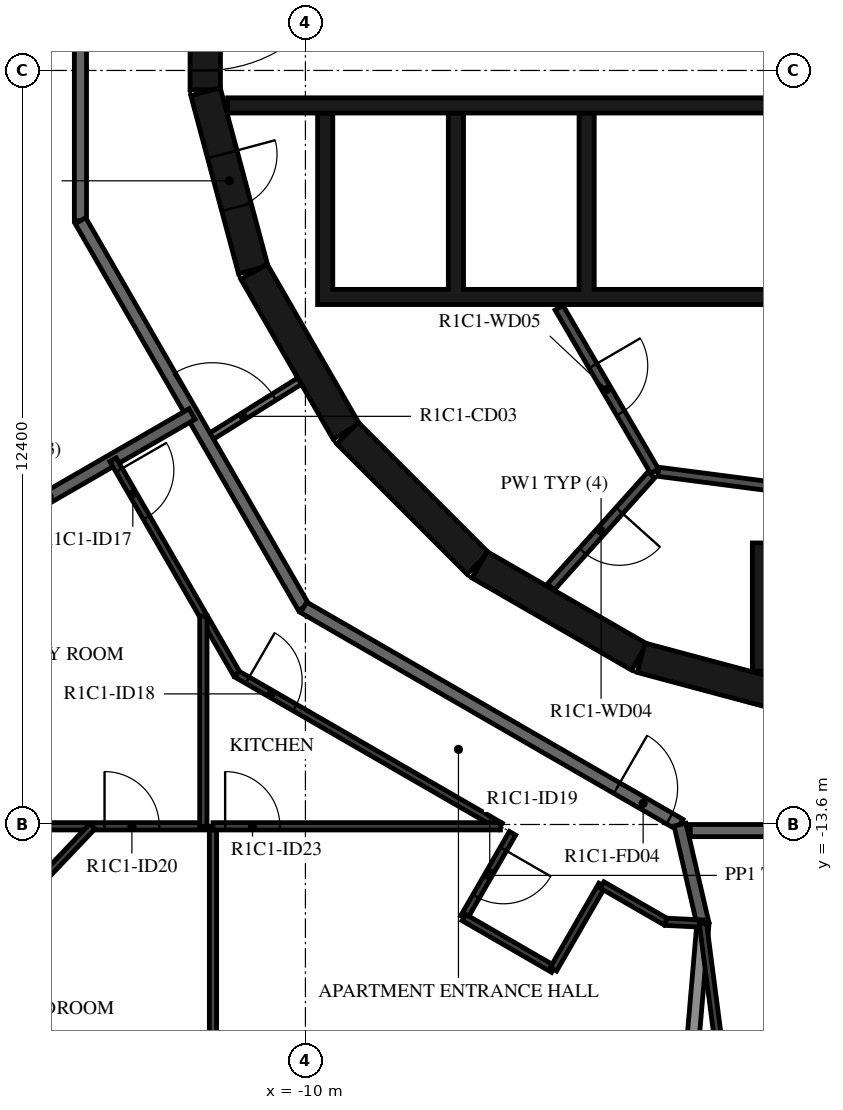
"""IFC4 building model, lengths in metres.
Left out: names, types, materials, properties, quantities, classifications, styles, units other than length and angle.
Written with IfcOpenShell. Run it as: python <this file> out.ifc"""

import sys

from ifc_helpers import new_model, si_unit, direction, frame, frame_2d, origin, place, context, subcontext, project, spatial, polyline, rectangle, outline, extrude, element, fill, save


model = new_model("IFC4")
c1 = context("Model", 3, precision=1e-05, world=origin(), true_north=direction((0.0, 1.0)))
c2 = subcontext(c1, "Body", "Model", "MODEL_VIEW")
j1 = project(units=[si_unit("LENGTHUNIT", "METRE"), si_unit("PLANEANGLEUNIT", "RADIAN")], contexts=[c1])
p1 = place(None, origin())
s1 = spatial("IfcSite", under=j1, at=p1, CompositionType="ELEMENT")
p2 = place(p1, origin())
s2 = spatial("IfcBuilding", under=s1, at=p2, CompositionType="ELEMENT")
p3 = place(p2, frame((0.0, 0.0, 62.9)))
s3 = spatial("IfcBuildingStorey", under=s2, at=p3, CompositionType="ELEMENT", Elevation=62.9)
p4 = place(p3, frame((-11.647, 1.516, 0.0), z_axis=(0.0, 0.0, 1.0), x_axis=(0.0, -1.0, 0.0)))
e1 = element("IfcWall", 1, at=p4, inside=s3, PredefinedType="SHEAR", context=c2, shape_type="SweptSolid", body=[
    extrude(rectangle(XDim=3.033, YDim=0.5, at=frame_2d((1.516, 0.0))), origin(), (0.0, 0.0, 1.0), 3.12),
])
p5 = place(p4, frame((0.316, 0.0, 0.0)))
e2 = element("IfcOpeningElement", 2, at=p5, cuts=e1, PredefinedType="OPENING", context=c2, shape_type="SweptSolid", body=[
    extrude(rectangle(XDim=2.4, YDim=2.1, at=frame_2d((1.2, 1.05))), frame((0.0, 0.26, 0.0), z_axis=(0.0, -1.0, 0.0), x_axis=(1.0, 0.0, 0.0)), (0.0, 0.0, 1.0), 0.52),
])
p6 = place(p3, frame((-11.643, -1.55, 0.0), z_axis=(0.0, 0.0, 1.0), x_axis=(0.258734743916, -0.965948410781, 0.0)))
e3 = element("IfcWall", 3, at=p6, inside=s3, PredefinedType="SHEAR", context=c2, shape_type="SweptSolid", body=[
    extrude(rectangle(XDim=3.033, YDim=0.5, at=frame_2d((1.516, 0.0))), origin(), (0.0, 0.0, 1.0), 3.12),
])
p7 = place(p6, frame((1.066, 0.0, 0.0)))
e4 = element("IfcOpeningElement", 4, at=p7, cuts=e3, PredefinedType="OPENING", context=c2, shape_type="SweptSolid", body=[
    extrude(rectangle(XDim=0.9, YDim=2.1, at=frame_2d((0.45, 1.05))), frame((0.0, 0.26, 0.0), z_axis=(0.0, -1.0, 0.0), x_axis=(1.0, 0.0, 0.0)), (0.0, 0.0, 1.0), 0.52),
])
p8 = place(p3, frame((-10.845, -4.51, 0.0), z_axis=(0.0, 0.0, 1.0), x_axis=(0.500087131594, -0.865975092491, 0.0)))
e5 = element("IfcWall", 5, at=p8, inside=s3, PredefinedType="SHEAR", context=c2, shape_type="SweptSolid", body=[
    extrude(rectangle(XDim=3.033, YDim=0.5, at=frame_2d((1.516, 0.0))), origin(), (0.0, 0.0, 1.0), 3.12),
])
p9 = place(p3, frame((-9.308, -7.164, 0.0), z_axis=(0.0, 0.0, 1.0), x_axis=(0.707106781187, -0.707106781187, 0.0)))
e6 = element("IfcWall", 6, at=p9, inside=s3, PredefinedType="SHEAR", context=c2, shape_type="SweptSolid", body=[
    extrude(rectangle(XDim=3.032, YDim=0.5, at=frame_2d((1.516, 0.0))), origin(), (0.0, 0.0, 1.0), 3.12),
])
for number, where, z_axis, x_axis in (
    (7, (-7.137, -9.329, 0.0), (0.0, 0.0, 1.0), (0.866, -0.5, 0.0)),
    (8, (-4.479, -10.858, 0.0), (0.0, 0.0, 1.0), (0.966, -0.259, 0.0)),
):
    element("IfcWall", number, at=place(p3, frame(where, z_axis=z_axis, x_axis=x_axis)), inside=s3, PredefinedType="SHEAR", context=c2, shape_type="SweptSolid", body=[
        extrude(rectangle(XDim=3.033, YDim=0.5, at=frame_2d((1.516, 0.0))), origin(), (0.0, 0.0, 1.0), 3.12),
    ])
p10 = place(p3, frame((-2.525, -8.97, 0.0), z_axis=(0.0, 0.0, 1.0), x_axis=(0.0, -1.0, 0.0)))
e9 = element("IfcWall", 9, at=p10, inside=s3, PredefinedType="SHEAR", context=c2, shape_type="SweptSolid", body=[
    extrude(rectangle(XDim=2.11, YDim=0.25, at=frame_2d((1.055, 0.0))), origin(), (0.0, 0.0, 1.0), 3.12),
])
p11 = place(p3, origin())
e10 = element("IfcWall", 10, at=p11, inside=s3, PredefinedType="SHEAR", context=c2, shape_type="SweptSolid", body=[
    extrude(outline(polyline([(9.8, -5.05), (9.8, -4.8), (9.8, -1.9), (9.55, -1.9), (9.55, -4.8), (7.65, -4.8), (7.65, -1.9), (7.4, -1.9), (7.4, -4.8), (5.5, -4.8), (5.5, -1.9), (5.25, -1.9), (5.25, -4.8), (3.35, -4.8), (3.35, -1.9), (3.1, -1.9), (3.1, -4.8), (-5.25, -4.8), (-5.25, -1.9), (-5.5, -1.9), (-5.5, -4.8), (-7.4, -4.8), (-7.4, -1.9), (-7.65, -1.9), (-7.65, -4.8), (-9.55, -4.8), (-9.55, -1.9), (-9.8, -1.9), (-9.8, -4.8), (-9.8, -5.05), (9.8, -5.05)])), origin(), (0.0, 0.0, 1.0), 3.12),
])
p12 = place(p3, frame((-11.28, -1.775, 0.0), z_axis=(0.0, 0.0, 1.0), x_axis=(1.0, 0.0, 0.0)))
e11 = element("IfcWall", 11, at=p12, inside=s3, PredefinedType="SHEAR", context=c2, shape_type="SweptSolid", body=[
    extrude(rectangle(XDim=14.38, YDim=0.25, at=frame_2d((7.19, 0.0))), origin(), (0.0, 0.0, 1.0), 3.12),
])
p13 = place(p12, frame((9.755, 0.0, 0.0)))
e12 = element("IfcOpeningElement", 12, at=p13, cuts=e11, PredefinedType="OPENING", context=c2, shape_type="SweptSolid", body=[
    extrude(rectangle(XDim=0.9, YDim=2.1, at=frame_2d((0.45, 1.05))), frame((0.0, 0.135, 0.0), z_axis=(0.0, -1.0, 0.0), x_axis=(1.0, 0.0, 0.0)), (0.0, 0.0, 1.0), 0.27),
])
p14 = place(p3, frame((-5.829, -5.102, 0.0), z_axis=(0.0, 0.0, 1.0), x_axis=(0.504480008384, -0.863423373057, 0.0)))
e13 = element("IfcWall", 13, at=p14, inside=s3, PredefinedType="PARTITIONING", context=c2, shape_type="SweptSolid", body=[
    extrude(rectangle(XDim=3.115, YDim=0.15, at=frame_2d((1.558, 0.0))), origin(), (0.0, 0.0, 1.0), 3.12),
])
p15 = place(p14, frame((1.107, 0.0, 0.0)))
e14 = element("IfcOpeningElement", 14, at=p15, cuts=e13, PredefinedType="OPENING", context=c2, shape_type="SweptSolid", body=[
    extrude(rectangle(XDim=0.9, YDim=2.1, at=frame_2d((0.45, 1.05))), frame((0.0, 0.085, 0.0), z_axis=(0.0, -1.0, 0.0), x_axis=(1.0, 0.0, 0.0)), (0.0, 0.0, 1.0), 0.17),
])
p16 = place(p3, frame((-4.311, -7.851, 0.0), z_axis=(0.0, 0.0, 1.0), x_axis=(-0.667869133096, -0.744278725383, 0.0)))
e15 = element("IfcWall", 15, at=p16, inside=s3, PredefinedType="PARTITIONING", context=c2, shape_type="SweptSolid", body=[
    extrude(rectangle(XDim=2.476, YDim=0.15, at=frame_2d((1.238, 0.0))), origin(), (0.0, 0.0, 1.0), 3.12),
])
p17 = place(p16, frame((0.788, 0.0, 0.0)))
e16 = element("IfcOpeningElement", 16, at=p17, cuts=e15, PredefinedType="OPENING", context=c2, shape_type="SweptSolid", body=[
    extrude(rectangle(XDim=0.9, YDim=2.1, at=frame_2d((0.45, 1.05))), frame((0.0, 0.085, 0.0), z_axis=(0.0, -1.0, 0.0), x_axis=(1.0, 0.0, 0.0)), (0.0, 0.0, 1.0), 0.17),
])
p18 = place(p3, frame((-4.198, -7.799, 0.0), z_axis=(0.0, 0.0, 1.0), x_axis=(0.991686747293, -0.128675542523, 0.0)))
e17 = element("IfcWall", 17, at=p18, inside=s3, PredefinedType="PARTITIONING", context=c2, shape_type="SweptSolid", body=[
    extrude(rectangle(XDim=1.793, YDim=0.15, at=frame_2d((0.896, 0.0))), origin(), (0.0, 0.0, 1.0), 3.12),
])
p19 = place(p3, frame((-11.625, -7.264, 0.0), z_axis=(0.0, 0.0, 1.0), x_axis=(0.84803632456, 0.529938102259, 0.0)))
e18 = element("IfcWall", 18, at=p19, inside=s3, PredefinedType="PARTITIONING", context=c2, shape_type="SweptSolid", body=[
    extrude(rectangle(XDim=1.804, YDim=0.12, at=frame_2d((0.902, 0.0))), origin(), (0.0, 0.0, 1.0), 3.12),
])
p20 = place(p19, frame((0.11, 0.0, 0.0)))
e19 = element("IfcOpeningElement", 19, at=p20, cuts=e18, PredefinedType="OPENING", context=c2, shape_type="SweptSolid", body=[
    extrude(rectangle(XDim=1.2, YDim=2.1, at=frame_2d((0.6, 1.05))), frame((0.0, 0.07, 0.0), z_axis=(0.0, -1.0, 0.0), x_axis=(1.0, 0.0, 0.0)), (0.0, 0.0, 1.0), 0.14),
])
for number, where, z_axis, x_axis in (
    (20, (-13.7, 3.671, 0.0), (0.0, 0.0, 1.0), (0.0, -1.0, 0.0)),
    (21, (-13.7, -3.671, 0.0), (0.0, 0.0, 1.0), (0.5, -0.866, 0.0)),
):
    element("IfcWall", number, at=place(p3, frame(where, z_axis=z_axis, x_axis=x_axis)), inside=s3, PredefinedType="STANDARD", context=c2, shape_type="SweptSolid", body=[
        extrude(rectangle(XDim=7.342, YDim=0.2, at=frame_2d((3.671, 0.0))), origin(), (0.0, 0.0, 1.0), 3.12),
    ])
p21 = place(p3, frame((-10.029, -10.029, 0.0), z_axis=(0.0, 0.0, 1.0), x_axis=(0.866022878987, -0.500004373052, 0.0)))
e22 = element("IfcWall", 22, at=p21, inside=s3, PredefinedType="STANDARD", context=c2, shape_type="SweptSolid", body=[
    extrude(rectangle(XDim=7.146, YDim=0.2, at=frame_2d((3.573, 0.0))), origin(), (0.0, 0.0, 1.0), 3.12),
])
p22 = place(p21, frame((5.947, 0.0, 0.0)))
e23 = element("IfcOpeningElement", 23, at=p22, cuts=e22, PredefinedType="OPENING", context=c2, shape_type="SweptSolid", body=[
    extrude(rectangle(XDim=1.0, YDim=2.1, at=frame_2d((0.5, 1.05))), frame((0.0, 0.11, 0.0), z_axis=(0.0, -1.0, 0.0), x_axis=(1.0, 0.0, 0.0)), (0.0, 0.0, 1.0), 0.22),
])
p23 = place(p3, frame((-3.671, -13.7, 0.0), z_axis=(0.0, 0.0, 1.0), x_axis=(1.0, 0.0, 0.0)))
e24 = element("IfcWall", 24, at=p23, inside=s3, PredefinedType="STANDARD", context=c2, shape_type="SweptSolid", body=[
    extrude(rectangle(XDim=7.342, YDim=0.2, at=frame_2d((3.671, 0.0))), origin(), (0.0, 0.0, 1.0), 3.12),
])
p24 = place(p23, frame((2.1, 0.0, 0.0)))
e25 = element("IfcOpeningElement", 25, at=p24, cuts=e24, PredefinedType="OPENING", context=c2, shape_type="SweptSolid", body=[
    extrude(rectangle(XDim=1.0, YDim=2.1, at=frame_2d((0.5, 1.05))), frame((0.0, 0.11, 0.0), z_axis=(0.0, -1.0, 0.0), x_axis=(1.0, 0.0, 0.0)), (0.0, 0.0, 1.0), 0.22),
])
p25 = place(p3, frame((-16.565, -9.564, 0.0), z_axis=(0.0, 0.0, 1.0), x_axis=(0.866028274568, 0.499995027624, 0.0)))
e26 = element("IfcWall", 26, at=p25, inside=s3, PredefinedType="STANDARD", context=c2, shape_type="SweptSolid", body=[
    extrude(rectangle(XDim=5.427, YDim=0.2, at=frame_2d((2.714, 0.0))), origin(), (0.0, 0.0, 1.0), 3.12),
])
p26 = place(p3, frame((-3.463, -15.23, 0.0), z_axis=(0.0, 0.0, 1.0), x_axis=(-0.225894501138, 0.974151771725, 0.0)))
e27 = element("IfcWall", 27, at=p26, inside=s3, PredefinedType="STANDARD", context=c2, shape_type="SweptSolid", body=[
    extrude(rectangle(XDim=1.671, YDim=0.2, at=frame_2d((0.835, 0.0))), origin(), (0.0, 0.0, 1.0), 3.12),
])
p27 = place(p3, frame((-3.84, -19.63, 0.0), z_axis=(0.0, 0.0, 1.0), x_axis=(0.085470135005, 0.996340732893, 0.0)))
e28 = element("IfcWall", 28, at=p27, inside=s3, PredefinedType="STANDARD", context=c2, shape_type="SweptSolid", body=[
    extrude(rectangle(XDim=4.416, YDim=0.2, at=frame_2d((2.208, 0.0))), origin(), (0.0, 0.0, 1.0), 2.73),
])
p28 = place(p3, frame((-13.164, -7.6, 0.0), z_axis=(0.0, 0.0, 1.0), x_axis=(0.500000928893, -0.866024867487, 0.0)))
e29 = element("IfcWall", 29, at=p28, inside=s3, PredefinedType="PARTITIONING", context=c2, shape_type="SweptSolid", body=[
    extrude(rectangle(XDim=4.073, YDim=0.12, at=frame_2d((2.036, 0.0))), origin(), (0.0, 0.0, 1.0), 3.12),
])
p29 = place(p28, frame((0.2, 0.0, 0.0)))
e30 = element("IfcOpeningElement", 30, at=p29, cuts=e29, PredefinedType="OPENING", context=c2, shape_type="SweptSolid", body=[
    extrude(rectangle(XDim=0.9, YDim=2.1, at=frame_2d((0.45, 1.05))), frame((0.0, 0.07, 0.0), z_axis=(0.0, -1.0, 0.0), x_axis=(1.0, 0.0, 0.0)), (0.0, 0.0, 1.0), 0.14),
])
p30 = place(p3, frame((-11.127, -11.127, 0.0), z_axis=(0.0, 0.0, 1.0), x_axis=(0.866034514313, -0.499984219769, 0.0)))
e31 = element("IfcWall", 31, at=p30, inside=s3, PredefinedType="PARTITIONING", context=c2, shape_type="SweptSolid", body=[
    extrude(rectangle(XDim=5.006, YDim=0.12, at=frame_2d((2.503, 0.0))), origin(), (0.0, 0.0, 1.0), 3.12),
])
p31 = place(p30, frame((0.2, 0.0, 0.0)))
e32 = element("IfcOpeningElement", 32, at=p31, cuts=e31, PredefinedType="OPENING", context=c2, shape_type="SweptSolid", body=[
    extrude(rectangle(XDim=0.9, YDim=2.1, at=frame_2d((0.45, 1.05))), frame((0.0, 0.07, 0.0), z_axis=(0.0, -1.0, 0.0), x_axis=(1.0, 0.0, 0.0)), (0.0, 0.0, 1.0), 0.14),
])
p32 = place(p3, frame((-6.594, -13.744, 0.0), z_axis=(0.0, 0.0, 1.0), x_axis=(-0.499947031044, -0.866055983265, 0.0)))
e33 = element("IfcWall", 33, at=p32, inside=s3, PredefinedType="PARTITIONING", context=c2, shape_type="SweptSolid", body=[
    extrude(rectangle(XDim=1.6, YDim=0.12, at=frame_2d((0.8, 0.0))), origin(), (0.0, 0.0, 1.0), 3.12),
])
p33 = place(p32, frame((0.3, 0.0, 0.0)))
e34 = element("IfcOpeningElement", 34, at=p33, cuts=e33, PredefinedType="OPENING", context=c2, shape_type="SweptSolid", body=[
    extrude(rectangle(XDim=0.9, YDim=2.1, at=frame_2d((0.45, 1.05))), frame((0.0, 0.07, 0.0), z_axis=(0.0, -1.0, 0.0), x_axis=(1.0, 0.0, 0.0)), (0.0, 0.0, 1.0), 0.14),
])
p34 = place(p3, frame((-7.394, -15.13, 0.0), z_axis=(0.0, 0.0, 1.0), x_axis=(0.86605165483, -0.499954529098, 0.0)))
e35 = element("IfcWall", 35, at=p34, inside=s3, PredefinedType="PARTITIONING", context=c2, shape_type="SweptSolid", body=[
    extrude(rectangle(XDim=1.7, YDim=0.12, at=frame_2d((0.85, 0.0))), origin(), (0.0, 0.0, 1.0), 3.12),
])
p35 = place(p3, frame((-5.922, -15.98, 0.0), z_axis=(0.0, 0.0, 1.0), x_axis=(0.500013115284, 0.866017831539, 0.0)))
e36 = element("IfcWall", 36, at=p35, inside=s3, PredefinedType="PARTITIONING", context=c2, shape_type="SweptSolid", body=[
    extrude(rectangle(XDim=1.6, YDim=0.12, at=frame_2d((0.8, 0.0))), origin(), (0.0, 0.0, 1.0), 3.12),
])
p36 = place(p3, frame((-5.122, -14.594, 0.0), z_axis=(0.0, 0.0, 1.0), x_axis=(0.86610168388, -0.499867855718, 0.0)))
e37 = element("IfcWall", 37, at=p36, inside=s3, PredefinedType="PARTITIONING", context=c2, shape_type="SweptSolid", body=[
    extrude(rectangle(XDim=1.211, YDim=0.12, at=frame_2d((0.605, 0.0))), origin(), (0.0, 0.0, 1.0), 3.12),
])
p37 = place(p3, frame((-4.073, -15.2, 0.0), z_axis=(0.0, 0.0, 1.0), x_axis=(0.99879090756, -0.049160176723, 0.0)))
e38 = element("IfcWall", 38, at=p37, inside=s3, PredefinedType="PARTITIONING", context=c2, shape_type="SweptSolid", body=[
    extrude(rectangle(XDim=0.611, YDim=0.12, at=frame_2d((0.305, 0.0))), origin(), (0.0, 0.0, 1.0), 3.12),
])
p38 = place(p3, frame((-19.794, -13.63, 0.0), z_axis=(0.0, 0.0, 1.0), x_axis=(1.0, 0.0, 0.0)))
e39 = element("IfcWall", 39, at=p38, inside=s3, PredefinedType="PARTITIONING", context=c2, shape_type="SweptSolid", body=[
    extrude(rectangle(XDim=8.156, YDim=0.12, at=frame_2d((4.078, 0.0))), origin(), (0.0, 0.0, 1.0), 3.12),
])
p39 = place(p38, frame((6.491, 0.0, 0.0)))
e40 = element("IfcOpeningElement", 40, at=p39, cuts=e39, PredefinedType="OPENING", context=c2, shape_type="SweptSolid", body=[
    extrude(rectangle(XDim=0.9, YDim=2.1, at=frame_2d((0.45, 1.05))), frame((0.0, 0.07, 0.0), z_axis=(0.0, -1.0, 0.0), x_axis=(1.0, 0.0, 0.0)), (0.0, 0.0, 1.0), 0.14),
])
p40 = place(p3, frame((-11.678, -13.63, 0.0), z_axis=(0.0, 0.0, 1.0), x_axis=(0.0, 1.0, 0.0)))
e41 = element("IfcWall", 41, at=p40, inside=s3, PredefinedType="PARTITIONING", context=c2, shape_type="SweptSolid", body=[
    extrude(rectangle(XDim=3.458, YDim=0.12, at=frame_2d((1.729, 0.0))), origin(), (0.0, 0.0, 1.0), 3.12),
])
p41 = place(p3, frame((-19.2, -19.63, 0.0), z_axis=(0.0, 0.0, 1.0), x_axis=(0.688544699396, 0.72519390299, 0.0)))
e42 = element("IfcWall", 42, at=p41, inside=s3, PredefinedType="PARTITIONING", context=c2, shape_type="SweptSolid", body=[
    extrude(rectangle(XDim=8.274, YDim=0.12, at=frame_2d((4.137, 0.0))), origin(), (0.0, 0.0, 1.0), 3.12),
])
p42 = place(p41, frame((0.8, 0.0, 0.0)))
e43 = element("IfcOpeningElement", 43, at=p42, cuts=e42, PredefinedType="OPENING", context=c2, shape_type="SweptSolid", body=[
    extrude(rectangle(XDim=0.9, YDim=2.1, at=frame_2d((0.45, 1.05))), frame((0.0, 0.07, 0.0), z_axis=(0.0, -1.0, 0.0), x_axis=(1.0, 0.0, 0.0)), (0.0, 0.0, 1.0), 0.14),
])
p43 = place(p3, frame((-11.52, -19.63, 0.0), z_axis=(0.0, 0.0, 1.0), x_axis=(0.0, 1.0, 0.0)))
e44 = element("IfcWall", 44, at=p43, inside=s3, PredefinedType="PARTITIONING", context=c2, shape_type="SweptSolid", body=[
    extrude(rectangle(XDim=6.0, YDim=0.12, at=frame_2d((3.0, 0.0))), origin(), (0.0, 0.0, 1.0), 2.73),
])
p44 = place(p3, frame((-11.52, -13.63, 0.0), z_axis=(0.0, 0.0, 1.0), x_axis=(1.0, 0.0, 0.0)))
e45 = element("IfcWall", 45, at=p44, inside=s3, PredefinedType="PARTITIONING", context=c2, shape_type="SweptSolid", body=[
    extrude(rectangle(XDim=4.728, YDim=0.12, at=frame_2d((2.364, 0.0))), origin(), (0.0, 0.0, 1.0), 3.12),
])
p45 = place(p44, frame((0.2, 0.0, 0.0)))
e46 = element("IfcOpeningElement", 46, at=p45, cuts=e45, PredefinedType="OPENING", context=c2, shape_type="SweptSolid", body=[
    extrude(rectangle(XDim=0.9, YDim=2.1, at=frame_2d((0.45, 1.05))), frame((0.0, 0.07, 0.0), z_axis=(0.0, -1.0, 0.0), x_axis=(1.0, 0.0, 0.0)), (0.0, 0.0, 1.0), 0.14),
])
p46 = place(p3, frame((-3.463, -15.23, 0.0), z_axis=(0.0, 0.0, 1.0), x_axis=(0.129260547059, -0.991610665016, 0.0)))
e47 = element("IfcWall", 47, at=p46, inside=s3, PredefinedType="PARTITIONING", context=c2, shape_type="SweptSolid", body=[
    extrude(rectangle(XDim=2.92, YDim=0.12, at=frame_2d((1.46, 0.0))), origin(), (0.0, 0.0, 1.0), 3.12),
])
p47 = place(p5, origin())
e48 = element("IfcDoor", 48, at=p47, inside=s3, OperationType="DOUBLE_DOOR_SINGLE_SWING", PredefinedType="DOOR", context=c2, shape_type="SweptSolid", body=[
    extrude(rectangle(XDim=2.4, YDim=2.1, at=frame_2d((1.2, 1.05))), frame((0.0, 0.025, 0.0), z_axis=(0.0, -1.0, 0.0), x_axis=(1.0, 0.0, 0.0)), (0.0, 0.0, 1.0), 0.05),
])
fill(e2, e48)
p48 = place(p17, origin())
e49 = element("IfcDoor", 49, at=p48, inside=s3, OperationType="SINGLE_SWING_LEFT", PredefinedType="DOOR", context=c2, shape_type="SweptSolid", body=[
    extrude(rectangle(XDim=0.9, YDim=2.1, at=frame_2d((0.45, 1.05))), frame((0.0, 0.025, 0.0), z_axis=(0.0, -1.0, 0.0), x_axis=(1.0, 0.0, 0.0)), (0.0, 0.0, 1.0), 0.05),
])
fill(e16, e49)
p49 = place(p15, origin())
e50 = element("IfcDoor", 50, at=p49, inside=s3, OperationType="SINGLE_SWING_RIGHT", PredefinedType="DOOR", context=c2, shape_type="SweptSolid", body=[
    extrude(rectangle(XDim=0.9, YDim=2.1, at=frame_2d((0.45, 1.05))), frame((0.0, 0.025, 0.0), z_axis=(0.0, -1.0, 0.0), x_axis=(1.0, 0.0, 0.0)), (0.0, 0.0, 1.0), 0.05),
])
fill(e14, e50)
p50 = place(p7, origin())
e51 = element("IfcDoor", 51, at=p50, inside=s3, OperationType="SINGLE_SWING_LEFT", PredefinedType="DOOR", context=c2, shape_type="SweptSolid", body=[
    extrude(rectangle(XDim=0.9, YDim=2.1, at=frame_2d((0.45, 1.05))), frame((0.0, 0.025, 0.0), z_axis=(0.0, -1.0, 0.0), x_axis=(1.0, 0.0, 0.0)), (0.0, 0.0, 1.0), 0.05),
])
fill(e4, e51)
p51 = place(p22, origin())
e52 = element("IfcDoor", 52, at=p51, inside=s3, OperationType="SINGLE_SWING_LEFT", PredefinedType="DOOR", context=c2, shape_type="SweptSolid", body=[
    extrude(rectangle(XDim=1.0, YDim=2.1, at=frame_2d((0.5, 1.05))), frame((0.0, 0.025, 0.0), z_axis=(0.0, -1.0, 0.0), x_axis=(1.0, 0.0, 0.0)), (0.0, 0.0, 1.0), 0.05),
])
fill(e23, e52)
p52 = place(p29, origin())
e53 = element("IfcDoor", 53, at=p52, inside=s3, OperationType="SINGLE_SWING_LEFT", PredefinedType="DOOR", context=c2, shape_type="SweptSolid", body=[
    extrude(rectangle(XDim=0.9, YDim=2.1, at=frame_2d((0.45, 1.05))), frame((0.0, 0.025, 0.0), z_axis=(0.0, -1.0, 0.0), x_axis=(1.0, 0.0, 0.0)), (0.0, 0.0, 1.0), 0.05),
])
fill(e30, e53)
p53 = place(p31, origin())
e54 = element("IfcDoor", 54, at=p53, inside=s3, OperationType="SINGLE_SWING_LEFT", PredefinedType="DOOR", context=c2, shape_type="SweptSolid", body=[
    extrude(rectangle(XDim=0.9, YDim=2.1, at=frame_2d((0.45, 1.05))), frame((0.0, 0.025, 0.0), z_axis=(0.0, -1.0, 0.0), x_axis=(1.0, 0.0, 0.0)), (0.0, 0.0, 1.0), 0.05),
])
fill(e32, e54)
p54 = place(p33, origin())
e55 = element("IfcDoor", 55, at=p54, inside=s3, OperationType="SINGLE_SWING_RIGHT", PredefinedType="DOOR", context=c2, shape_type="SweptSolid", body=[
    extrude(rectangle(XDim=0.9, YDim=2.1, at=frame_2d((0.45, 1.05))), frame((0.0, 0.025, 0.0), z_axis=(0.0, -1.0, 0.0), x_axis=(1.0, 0.0, 0.0)), (0.0, 0.0, 1.0), 0.05),
])
fill(e34, e55)
p55 = place(p39, origin())
e56 = element("IfcDoor", 56, at=p55, inside=s3, OperationType="SINGLE_SWING_LEFT", PredefinedType="DOOR", context=c2, shape_type="SweptSolid", body=[
    extrude(rectangle(XDim=0.9, YDim=2.1, at=frame_2d((0.45, 1.05))), frame((0.0, 0.025, 0.0), z_axis=(0.0, -1.0, 0.0), x_axis=(1.0, 0.0, 0.0)), (0.0, 0.0, 1.0), 0.05),
])
fill(e40, e56)
p56 = place(p45, origin())
e57 = element("IfcDoor", 57, at=p56, inside=s3, OperationType="SINGLE_SWING_RIGHT", PredefinedType="DOOR", context=c2, shape_type="SweptSolid", body=[
    extrude(rectangle(XDim=0.9, YDim=2.1, at=frame_2d((0.45, 1.05))), frame((0.0, 0.025, 0.0), z_axis=(0.0, -1.0, 0.0), x_axis=(1.0, 0.0, 0.0)), (0.0, 0.0, 1.0), 0.05),
])
fill(e46, e57)
p57 = place(p20, origin())
e58 = element("IfcDoor", 58, at=p57, inside=s3, OperationType="DOUBLE_DOOR_SINGLE_SWING", PredefinedType="DOOR", context=c2, shape_type="SweptSolid", body=[
    extrude(rectangle(XDim=1.2, YDim=2.1, at=frame_2d((0.6, 1.05))), frame((0.0, 0.025, 0.0), z_axis=(0.0, -1.0, 0.0), x_axis=(1.0, 0.0, 0.0)), (0.0, 0.0, 1.0), 0.05),
])
fill(e19, e58)
save(model, sys.argv[1])
